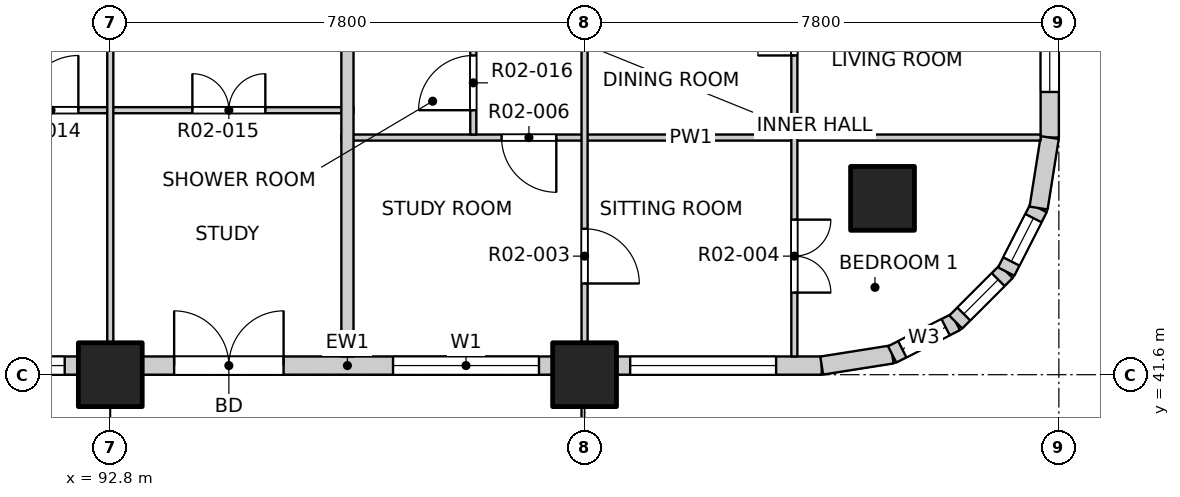
"""IFC4 building model, lengths in metres.
Left out: names, types, materials, properties, quantities, classifications, styles, units other than length and angle.
Written with IfcOpenShell. Run it as: python <this file> out.ifc"""

import sys

from ifc_helpers import new_model, si_unit, direction, frame, frame_2d, origin, origin_2d, place, context, subcontext, project, spatial, rectangle, extrude, element, fill, save


model = new_model("IFC4")
c1 = context("Model", 3, precision=1e-05, world=origin(), true_north=direction((0.0, 1.0)))
c2 = subcontext(c1, "Body", "Model", "MODEL_VIEW")
j1 = project(units=[si_unit("LENGTHUNIT", "METRE"), si_unit("PLANEANGLEUNIT", "RADIAN")], contexts=[c1])
p1 = place(None, origin())
s1 = spatial("IfcSite", under=j1, at=p1, CompositionType="ELEMENT")
p2 = place(p1, origin())
s2 = spatial("IfcBuilding", under=s1, at=p2, CompositionType="ELEMENT")
p3 = place(p2, frame((0.0, 0.0, 36.5)))
s3 = spatial("IfcBuildingStorey", under=s2, at=p3, CompositionType="ELEMENT", Elevation=36.5)
for number, where, z_axis, x_axis in (
    (1, (105.5, 44.5, -0.25), (0.0, 0.0, 1.0), (1.0, 0.0, 0.0)),
    (2, (92.8, 41.6, -0.25), (0.0, 0.0, 1.0), (1.0, 0.0, 0.0)),
    (3, (100.6, 41.6, -0.25), (0.0, 0.0, 1.0), (1.0, 0.0, 0.0)),
):
    element("IfcColumn", number, at=place(p3, frame(where, z_axis=z_axis, x_axis=x_axis)), inside=s3, PredefinedType="COLUMN", context=c2, shape_type="SweptSolid", body=[
        extrude(rectangle(XDim=1.05, YDim=1.05, at=origin_2d()), origin(), (0.0, 0.0, 1.0), 3.4),
    ])
p4 = place(p3, frame((85.525, 41.75, 0.0), z_axis=(0.0, 0.0, 1.0), x_axis=(1.0, 0.0, 0.0)))
e4 = element("IfcWall", 4, at=p4, inside=s3, PredefinedType="SOLIDWALL", context=c2, shape_type="SweptSolid", body=[
    extrude(rectangle(XDim=6.75, YDim=0.3, at=frame_2d((3.375, 0.0))), origin(), (0.0, 0.0, 1.0), 2.7),
])
p5 = place(p4, frame((0.525, 0.0, 0.0)))
e5 = element("IfcOpeningElement", 5, at=p5, cuts=e4, PredefinedType="OPENING", context=c2, shape_type="SweptSolid", body=[
    extrude(rectangle(XDim=1.8, YDim=2.4, at=frame_2d((0.9, 1.2))), frame((0.0, 0.16, 0.0), z_axis=(0.0, -1.0, 0.0), x_axis=(1.0, 0.0, 0.0)), (0.0, 0.0, 1.0), 0.32),
])
p6 = place(p4, frame((4.125, 0.0, 0.9)))
e6 = element("IfcOpeningElement", 6, at=p6, cuts=e4, PredefinedType="OPENING", context=c2, shape_type="SweptSolid", body=[
    extrude(rectangle(XDim=2.4, YDim=1.8, at=frame_2d((1.2, 0.9))), frame((0.0, 0.16, 0.0), z_axis=(0.0, -1.0, 0.0), x_axis=(1.0, 0.0, 0.0)), (0.0, 0.0, 1.0), 0.32),
])
p7 = place(p3, frame((93.325, 41.75, 0.0), z_axis=(0.0, 0.0, 1.0), x_axis=(1.0, 0.0, 0.0)))
e7 = element("IfcWall", 7, at=p7, inside=s3, PredefinedType="SOLIDWALL", context=c2, shape_type="SweptSolid", body=[
    extrude(rectangle(XDim=6.75, YDim=0.3, at=frame_2d((3.375, 0.0))), origin(), (0.0, 0.0, 1.0), 2.7),
])
p8 = place(p7, frame((0.525, 0.0, 0.0)))
e8 = element("IfcOpeningElement", 8, at=p8, cuts=e7, PredefinedType="OPENING", context=c2, shape_type="SweptSolid", body=[
    extrude(rectangle(XDim=1.8, YDim=2.4, at=frame_2d((0.9, 1.2))), frame((0.0, 0.16, 0.0), z_axis=(0.0, -1.0, 0.0), x_axis=(1.0, 0.0, 0.0)), (0.0, 0.0, 1.0), 0.32),
])
p9 = place(p7, frame((4.125, 0.0, 0.9)))
e9 = element("IfcOpeningElement", 9, at=p9, cuts=e7, PredefinedType="OPENING", context=c2, shape_type="SweptSolid", body=[
    extrude(rectangle(XDim=2.4, YDim=1.8, at=frame_2d((1.2, 0.9))), frame((0.0, 0.16, 0.0), z_axis=(0.0, -1.0, 0.0), x_axis=(1.0, 0.0, 0.0)), (0.0, 0.0, 1.0), 0.32),
])
p10 = place(p3, frame((101.125, 41.75, 0.0), z_axis=(0.0, 0.0, 1.0), x_axis=(1.0, 0.0, 0.0)))
e10 = element("IfcWall", 10, at=p10, inside=s3, PredefinedType="SOLIDWALL", context=c2, shape_type="SweptSolid", body=[
    extrude(rectangle(XDim=3.375, YDim=0.3, at=frame_2d((1.688, 0.0))), origin(), (0.0, 0.0, 1.0), 2.7),
])
p11 = place(p10, frame((0.225, 0.0, 0.9)))
e11 = element("IfcOpeningElement", 11, at=p11, cuts=e10, PredefinedType="OPENING", context=c2, shape_type="SweptSolid", body=[
    extrude(rectangle(XDim=2.4, YDim=1.8, at=frame_2d((1.2, 0.9))), frame((0.0, 0.16, 0.0), z_axis=(0.0, -1.0, 0.0), x_axis=(1.0, 0.0, 0.0)), (0.0, 0.0, 1.0), 0.32),
])
p12 = place(p3, frame((108.25, 45.5, 0.0), z_axis=(0.0, 0.0, 1.0), x_axis=(0.0, 1.0, 0.0)))
e12 = element("IfcWall", 12, at=p12, inside=s3, PredefinedType="SOLIDWALL", context=c2, shape_type="SweptSolid", body=[
    extrude(rectangle(XDim=3.375, YDim=0.3, at=frame_2d((1.688, 0.0))), origin(), (0.0, 0.0, 1.0), 2.7),
])
p13 = place(p12, frame((0.75, 0.0, 0.9)))
e13 = element("IfcOpeningElement", 13, at=p13, cuts=e12, PredefinedType="OPENING", context=c2, shape_type="SweptSolid", body=[
    extrude(rectangle(XDim=2.4, YDim=1.8, at=frame_2d((1.2, 0.9))), frame((0.0, 0.16, 0.0), z_axis=(0.0, -1.0, 0.0), x_axis=(1.0, 0.0, 0.0)), (0.0, 0.0, 1.0), 0.32),
])
p14 = place(p3, frame((104.5, 41.75, 0.0), z_axis=(0.0, 0.0, 1.0), x_axis=(0.987678452879, 0.156496880861, 0.0)))
e14 = element("IfcWall", 14, at=p14, inside=s3, PredefinedType="SOLIDWALL", context=c2, shape_type="SweptSolid", body=[
    extrude(rectangle(XDim=1.173, YDim=0.3, at=frame_2d((0.586, 0.0))), origin(), (0.0, 0.0, 1.0), 2.7),
])
p15 = place(p3, frame((105.659, 41.934, 0.0), z_axis=(0.0, 0.0, 1.0), x_axis=(0.890988677504, 0.454025524128, 0.0)))
e15 = element("IfcWall", 15, at=p15, inside=s3, PredefinedType="SOLIDWALL", context=c2, shape_type="SweptSolid", body=[
    extrude(rectangle(XDim=1.173, YDim=0.3, at=frame_2d((0.587, 0.0))), origin(), (0.0, 0.0, 1.0), 2.7),
])
p16 = place(p15, frame((0.187, 0.0, 0.9)))
e16 = element("IfcOpeningElement", 16, at=p16, cuts=e15, PredefinedType="OPENING", context=c2, shape_type="SweptSolid", body=[
    extrude(rectangle(XDim=0.8, YDim=1.2, at=frame_2d((0.4, 0.6))), frame((0.0, 0.16, 0.0), z_axis=(0.0, -1.0, 0.0), x_axis=(1.0, 0.0, 0.0)), (0.0, 0.0, 1.0), 0.32),
])
p17 = place(p3, frame((106.704, 42.466, 0.0), z_axis=(0.0, 0.0, 1.0), x_axis=(0.707106781187, 0.707106781187, 0.0)))
e17 = element("IfcWall", 17, at=p17, inside=s3, PredefinedType="SOLIDWALL", context=c2, shape_type="SweptSolid", body=[
    extrude(rectangle(XDim=1.173, YDim=0.3, at=frame_2d((0.586, 0.0))), origin(), (0.0, 0.0, 1.0), 2.7),
])
p18 = place(p17, frame((0.187, 0.0, 0.9)))
e18 = element("IfcOpeningElement", 18, at=p18, cuts=e17, PredefinedType="OPENING", context=c2, shape_type="SweptSolid", body=[
    extrude(rectangle(XDim=0.8, YDim=1.2, at=frame_2d((0.4, 0.6))), frame((0.0, 0.16, 0.0), z_axis=(0.0, -1.0, 0.0), x_axis=(1.0, 0.0, 0.0)), (0.0, 0.0, 1.0), 0.32),
])
p19 = place(p3, frame((107.534, 43.296, 0.0), z_axis=(0.0, 0.0, 1.0), x_axis=(0.454025524128, 0.890988677504, 0.0)))
e19 = element("IfcWall", 19, at=p19, inside=s3, PredefinedType="SOLIDWALL", context=c2, shape_type="SweptSolid", body=[
    extrude(rectangle(XDim=1.173, YDim=0.3, at=frame_2d((0.587, 0.0))), origin(), (0.0, 0.0, 1.0), 2.7),
])
p20 = place(p19, frame((0.187, 0.0, 0.9)))
e20 = element("IfcOpeningElement", 20, at=p20, cuts=e19, PredefinedType="OPENING", context=c2, shape_type="SweptSolid", body=[
    extrude(rectangle(XDim=0.8, YDim=1.2, at=frame_2d((0.4, 0.6))), frame((0.0, 0.16, 0.0), z_axis=(0.0, -1.0, 0.0), x_axis=(1.0, 0.0, 0.0)), (0.0, 0.0, 1.0), 0.32),
])
p21 = place(p3, frame((108.066, 44.341, 0.0), z_axis=(0.0, 0.0, 1.0), x_axis=(0.156496880861, 0.987678452879, 0.0)))
e21 = element("IfcWall", 21, at=p21, inside=s3, PredefinedType="SOLIDWALL", context=c2, shape_type="SweptSolid", body=[
    extrude(rectangle(XDim=1.173, YDim=0.3, at=frame_2d((0.586, 0.0))), origin(), (0.0, 0.0, 1.0), 2.7),
])
p22 = place(p3, frame((96.6, 45.5, 0.0), z_axis=(0.0, 0.0, 1.0), x_axis=(1.0, 0.0, 0.0)))
e22 = element("IfcWall", 22, at=p22, inside=s3, PredefinedType="PARTITIONING", context=c2, shape_type="SweptSolid", body=[
    extrude(rectangle(XDim=11.5, YDim=0.1, at=frame_2d((5.75, 0.0))), origin(), (0.0, 0.0, 1.0), 3.15),
])
p23 = place(p22, frame((2.635, 0.0, 0.0)))
e23 = element("IfcOpeningElement", 23, at=p23, cuts=e22, PredefinedType="OPENING", context=c2, shape_type="SweptSolid", body=[
    extrude(rectangle(XDim=0.9, YDim=2.1, at=frame_2d((0.45, 1.05))), frame((0.0, 0.06, 0.0), z_axis=(0.0, -1.0, 0.0), x_axis=(1.0, 0.0, 0.0)), (0.0, 0.0, 1.0), 0.12),
])
p24 = place(p3, frame((81.0, 45.95, 0.0), z_axis=(0.0, 0.0, 1.0), x_axis=(1.0, 0.0, 0.0)))
e24 = element("IfcWall", 24, at=p24, inside=s3, PredefinedType="PARTITIONING", context=c2, shape_type="SweptSolid", body=[
    extrude(rectangle(XDim=15.8, YDim=0.1, at=frame_2d((7.9, 0.0))), origin(), (0.0, 0.0, 1.0), 3.15),
])
p25 = place(p24, frame((0.625, 0.0, 0.0)))
e25 = element("IfcOpeningElement", 25, at=p25, cuts=e24, PredefinedType="OPENING", context=c2, shape_type="SweptSolid", body=[
    extrude(rectangle(XDim=0.9, YDim=2.1, at=frame_2d((0.45, 1.05))), frame((0.0, 0.06, 0.0), z_axis=(0.0, -1.0, 0.0), x_axis=(1.0, 0.0, 0.0)), (0.0, 0.0, 1.0), 0.12),
])
p26 = place(p24, frame((2.575, 0.0, 0.0)))
e26 = element("IfcOpeningElement", 26, at=p26, cuts=e24, PredefinedType="OPENING", context=c2, shape_type="SweptSolid", body=[
    extrude(rectangle(XDim=0.9, YDim=2.1, at=frame_2d((0.45, 1.05))), frame((0.0, 0.06, 0.0), z_axis=(0.0, -1.0, 0.0), x_axis=(1.0, 0.0, 0.0)), (0.0, 0.0, 1.0), 0.12),
])
p27 = place(p24, frame((5.35, 0.0, 0.0)))
e27 = element("IfcOpeningElement", 27, at=p27, cuts=e24, PredefinedType="OPENING", context=c2, shape_type="SweptSolid", body=[
    extrude(rectangle(XDim=1.2, YDim=2.1, at=frame_2d((0.6, 1.05))), frame((0.0, 0.06, 0.0), z_axis=(0.0, -1.0, 0.0), x_axis=(1.0, 0.0, 0.0)), (0.0, 0.0, 1.0), 0.12),
])
p28 = place(p24, frame((8.425, 0.0, 0.0)))
e28 = element("IfcOpeningElement", 28, at=p28, cuts=e24, PredefinedType="OPENING", context=c2, shape_type="SweptSolid", body=[
    extrude(rectangle(XDim=0.9, YDim=2.1, at=frame_2d((0.45, 1.05))), frame((0.0, 0.06, 0.0), z_axis=(0.0, -1.0, 0.0), x_axis=(1.0, 0.0, 0.0)), (0.0, 0.0, 1.0), 0.12),
])
p29 = place(p24, frame((10.375, 0.0, 0.0)))
e29 = element("IfcOpeningElement", 29, at=p29, cuts=e24, PredefinedType="OPENING", context=c2, shape_type="SweptSolid", body=[
    extrude(rectangle(XDim=0.9, YDim=2.1, at=frame_2d((0.45, 1.05))), frame((0.0, 0.06, 0.0), z_axis=(0.0, -1.0, 0.0), x_axis=(1.0, 0.0, 0.0)), (0.0, 0.0, 1.0), 0.12),
])
p30 = place(p24, frame((13.15, 0.0, 0.0)))
e30 = element("IfcOpeningElement", 30, at=p30, cuts=e24, PredefinedType="OPENING", context=c2, shape_type="SweptSolid", body=[
    extrude(rectangle(XDim=1.2, YDim=2.1, at=frame_2d((0.6, 1.05))), frame((0.0, 0.06, 0.0), z_axis=(0.0, -1.0, 0.0), x_axis=(1.0, 0.0, 0.0)), (0.0, 0.0, 1.0), 0.12),
])
p31 = place(p3, frame((92.8, 41.9, 0.0), z_axis=(0.0, 0.0, 1.0), x_axis=(0.0, 1.0, 0.0)))
e31 = element("IfcWall", 31, at=p31, inside=s3, PredefinedType="PARTITIONING", context=c2, shape_type="SweptSolid", body=[
    extrude(rectangle(XDim=7.45, YDim=0.1, at=frame_2d((3.725, 0.0))), origin(), (0.0, 0.0, 1.0), 2.55),
])
p32 = place(p3, frame((96.7, 41.9, 0.0), z_axis=(0.0, 0.0, 1.0), x_axis=(0.0, 1.0, 0.0)))
e32 = element("IfcWall", 32, at=p32, inside=s3, PredefinedType="PARTITIONING", context=c2, shape_type="SweptSolid", body=[
    extrude(rectangle(XDim=11.3, YDim=0.2, at=frame_2d((5.65, 0.0))), origin(), (0.0, 0.0, 1.0), 3.15),
])
p33 = place(p3, frame((98.77, 45.55, 0.0), z_axis=(0.0, 0.0, 1.0), x_axis=(0.0, 1.0, 0.0)))
e33 = element("IfcWall", 33, at=p33, inside=s3, PredefinedType="PARTITIONING", context=c2, shape_type="SweptSolid", body=[
    extrude(rectangle(XDim=8.95, YDim=0.1, at=frame_2d((4.475, 0.0))), origin(), (0.0, 0.0, 1.0), 3.15),
])
p34 = place(p33, frame((0.4, 0.0, 0.0)))
e34 = element("IfcOpeningElement", 34, at=p34, cuts=e33, PredefinedType="OPENING", context=c2, shape_type="SweptSolid", body=[
    extrude(rectangle(XDim=0.9, YDim=2.1, at=frame_2d((0.45, 1.05))), frame((0.0, 0.06, 0.0), z_axis=(0.0, -1.0, 0.0), x_axis=(1.0, 0.0, 0.0)), (0.0, 0.0, 1.0), 0.12),
])
p35 = place(p33, frame((2.5, 0.0, 0.0)))
e35 = element("IfcOpeningElement", 35, at=p35, cuts=e33, PredefinedType="OPENING", context=c2, shape_type="SweptSolid", body=[
    extrude(rectangle(XDim=0.9, YDim=2.1, at=frame_2d((0.45, 1.05))), frame((0.0, 0.06, 0.0), z_axis=(0.0, -1.0, 0.0), x_axis=(1.0, 0.0, 0.0)), (0.0, 0.0, 1.0), 0.12),
])
p36 = place(p33, frame((4.975, 0.0, 0.0)))
e36 = element("IfcOpeningElement", 36, at=p36, cuts=e33, PredefinedType="OPENING", context=c2, shape_type="SweptSolid", body=[
    extrude(rectangle(XDim=0.8, YDim=2.1, at=frame_2d((0.4, 1.05))), frame((0.0, 0.06, 0.0), z_axis=(0.0, -1.0, 0.0), x_axis=(1.0, 0.0, 0.0)), (0.0, 0.0, 1.0), 0.12),
])
p37 = place(p33, frame((7.4, 0.0, 0.0)))
e37 = element("IfcOpeningElement", 37, at=p37, cuts=e33, PredefinedType="OPENING", context=c2, shape_type="SweptSolid", body=[
    extrude(rectangle(XDim=0.8, YDim=2.1, at=frame_2d((0.4, 1.05))), frame((0.0, 0.06, 0.0), z_axis=(0.0, -1.0, 0.0), x_axis=(1.0, 0.0, 0.0)), (0.0, 0.0, 1.0), 0.12),
])
p38 = place(p3, frame((100.6, 41.9, 0.0), z_axis=(0.0, 0.0, 1.0), x_axis=(0.0, 1.0, 0.0)))
e38 = element("IfcWall", 38, at=p38, inside=s3, PredefinedType="PARTITIONING", context=c2, shape_type="SweptSolid", body=[
    extrude(rectangle(XDim=7.5, YDim=0.1, at=frame_2d((3.75, 0.0))), origin(), (0.0, 0.0, 1.0), 2.55),
])
p39 = place(p38, frame((1.2, 0.0, 0.0)))
e39 = element("IfcOpeningElement", 39, at=p39, cuts=e38, PredefinedType="OPENING", context=c2, shape_type="SweptSolid", body=[
    extrude(rectangle(XDim=0.9, YDim=2.1, at=frame_2d((0.45, 1.05))), frame((0.0, 0.06, 0.0), z_axis=(0.0, -1.0, 0.0), x_axis=(1.0, 0.0, 0.0)), (0.0, 0.0, 1.0), 0.12),
])
p40 = place(p38, frame((5.1, 0.0, 0.0)))
e40 = element("IfcOpeningElement", 40, at=p40, cuts=e38, PredefinedType="OPENING", context=c2, shape_type="SweptSolid", body=[
    extrude(rectangle(XDim=0.9, YDim=2.1, at=frame_2d((0.45, 1.05))), frame((0.0, 0.06, 0.0), z_axis=(0.0, -1.0, 0.0), x_axis=(1.0, 0.0, 0.0)), (0.0, 0.0, 1.0), 0.12),
])
p41 = place(p3, frame((104.05, 41.9, 0.0), z_axis=(0.0, 0.0, 1.0), x_axis=(0.0, 1.0, 0.0)))
e41 = element("IfcWall", 41, at=p41, inside=s3, PredefinedType="PARTITIONING", context=c2, shape_type="SweptSolid", body=[
    extrude(rectangle(XDim=19.1, YDim=0.1, at=frame_2d((9.55, 0.0))), origin(), (0.0, 0.0, 1.0), 3.15),
])
p42 = place(p41, frame((1.05, 0.0, 0.0)))
e42 = element("IfcOpeningElement", 42, at=p42, cuts=e41, PredefinedType="OPENING", context=c2, shape_type="SweptSolid", body=[
    extrude(rectangle(XDim=1.2, YDim=2.1, at=frame_2d((0.6, 1.05))), frame((0.0, 0.06, 0.0), z_axis=(0.0, -1.0, 0.0), x_axis=(1.0, 0.0, 0.0)), (0.0, 0.0, 1.0), 0.12),
])
p43 = place(p41, frame((4.95, 0.0, 0.0)))
e43 = element("IfcOpeningElement", 43, at=p43, cuts=e41, PredefinedType="OPENING", context=c2, shape_type="SweptSolid", body=[
    extrude(rectangle(XDim=1.2, YDim=2.1, at=frame_2d((0.6, 1.05))), frame((0.0, 0.06, 0.0), z_axis=(0.0, -1.0, 0.0), x_axis=(1.0, 0.0, 0.0)), (0.0, 0.0, 1.0), 0.12),
])
p44 = place(p41, frame((8.025, 0.0, 0.0)))
e44 = element("IfcOpeningElement", 44, at=p44, cuts=e41, PredefinedType="OPENING", context=c2, shape_type="SweptSolid", body=[
    extrude(rectangle(XDim=0.9, YDim=2.1, at=frame_2d((0.45, 1.05))), frame((0.0, 0.06, 0.0), z_axis=(0.0, -1.0, 0.0), x_axis=(1.0, 0.0, 0.0)), (0.0, 0.0, 1.0), 0.12),
])
p45 = place(p41, frame((9.975, 0.0, 0.0)))
e45 = element("IfcOpeningElement", 45, at=p45, cuts=e41, PredefinedType="OPENING", context=c2, shape_type="SweptSolid", body=[
    extrude(rectangle(XDim=0.9, YDim=2.1, at=frame_2d((0.45, 1.05))), frame((0.0, 0.06, 0.0), z_axis=(0.0, -1.0, 0.0), x_axis=(1.0, 0.0, 0.0)), (0.0, 0.0, 1.0), 0.12),
])
p46 = place(p41, frame((12.75, 0.0, 0.0)))
e46 = element("IfcOpeningElement", 46, at=p46, cuts=e41, PredefinedType="OPENING", context=c2, shape_type="SweptSolid", body=[
    extrude(rectangle(XDim=1.2, YDim=2.1, at=frame_2d((0.6, 1.05))), frame((0.0, 0.06, 0.0), z_axis=(0.0, -1.0, 0.0), x_axis=(1.0, 0.0, 0.0)), (0.0, 0.0, 1.0), 0.12),
])
p47 = place(p41, frame((15.825, 0.0, 0.0)))
e47 = element("IfcOpeningElement", 47, at=p47, cuts=e41, PredefinedType="OPENING", context=c2, shape_type="SweptSolid", body=[
    extrude(rectangle(XDim=0.9, YDim=2.1, at=frame_2d((0.45, 1.05))), frame((0.0, 0.06, 0.0), z_axis=(0.0, -1.0, 0.0), x_axis=(1.0, 0.0, 0.0)), (0.0, 0.0, 1.0), 0.12),
])
p48 = place(p41, frame((17.775, 0.0, 0.0)))
e48 = element("IfcOpeningElement", 48, at=p48, cuts=e41, PredefinedType="OPENING", context=c2, shape_type="SweptSolid", body=[
    extrude(rectangle(XDim=0.9, YDim=2.1, at=frame_2d((0.45, 1.05))), frame((0.0, 0.06, 0.0), z_axis=(0.0, -1.0, 0.0), x_axis=(1.0, 0.0, 0.0)), (0.0, 0.0, 1.0), 0.12),
])
p49 = place(p6, origin())
e49 = element("IfcWindow", 49, at=p49, inside=s3, PartitioningType="DOUBLE_PANEL_VERTICAL", PredefinedType="WINDOW", context=c2, shape_type="SweptSolid", body=[
    extrude(rectangle(XDim=2.4, YDim=1.8, at=frame_2d((1.2, 0.9))), frame((0.0, 0.03, 0.0), z_axis=(0.0, -1.0, 0.0), x_axis=(1.0, 0.0, 0.0)), (0.0, 0.0, 1.0), 0.06),
])
fill(e6, e49)
p50 = place(p8, origin())
e50 = element("IfcDoor", 50, at=p50, inside=s3, OperationType="DOUBLE_DOOR_SINGLE_SWING", PredefinedType="DOOR", context=c2, shape_type="SweptSolid", body=[
    extrude(rectangle(XDim=1.8, YDim=2.4, at=frame_2d((0.9, 1.2))), frame((0.0, 0.025, 0.0), z_axis=(0.0, -1.0, 0.0), x_axis=(1.0, 0.0, 0.0)), (0.0, 0.0, 1.0), 0.05),
])
fill(e8, e50)
p51 = place(p9, origin())
e51 = element("IfcWindow", 51, at=p51, inside=s3, PartitioningType="DOUBLE_PANEL_VERTICAL", PredefinedType="WINDOW", context=c2, shape_type="SweptSolid", body=[
    extrude(rectangle(XDim=2.4, YDim=1.8, at=frame_2d((1.2, 0.9))), frame((0.0, 0.03, 0.0), z_axis=(0.0, -1.0, 0.0), x_axis=(1.0, 0.0, 0.0)), (0.0, 0.0, 1.0), 0.06),
])
fill(e9, e51)
p52 = place(p11, origin())
e52 = element("IfcWindow", 52, at=p52, inside=s3, PartitioningType="DOUBLE_PANEL_VERTICAL", PredefinedType="WINDOW", context=c2, shape_type="SweptSolid", body=[
    extrude(rectangle(XDim=2.4, YDim=1.8, at=frame_2d((1.2, 0.9))), frame((0.0, 0.03, 0.0), z_axis=(0.0, -1.0, 0.0), x_axis=(1.0, 0.0, 0.0)), (0.0, 0.0, 1.0), 0.06),
])
fill(e11, e52)
p53 = place(p13, origin())
e53 = element("IfcWindow", 53, at=p53, inside=s3, PartitioningType="DOUBLE_PANEL_VERTICAL", PredefinedType="WINDOW", context=c2, shape_type="SweptSolid", body=[
    extrude(rectangle(XDim=2.4, YDim=1.8, at=frame_2d((1.2, 0.9))), frame((0.0, 0.03, 0.0), z_axis=(0.0, -1.0, 0.0), x_axis=(1.0, 0.0, 0.0)), (0.0, 0.0, 1.0), 0.06),
])
fill(e13, e53)
p54 = place(p16, origin())
e54 = element("IfcWindow", 54, at=p54, inside=s3, PartitioningType="SINGLE_PANEL", PredefinedType="WINDOW", context=c2, shape_type="SweptSolid", body=[
    extrude(rectangle(XDim=0.8, YDim=1.2, at=frame_2d((0.4, 0.6))), frame((0.0, 0.03, 0.0), z_axis=(0.0, -1.0, 0.0), x_axis=(1.0, 0.0, 0.0)), (0.0, 0.0, 1.0), 0.06),
])
fill(e16, e54)
p55 = place(p18, origin())
e55 = element("IfcWindow", 55, at=p55, inside=s3, PartitioningType="SINGLE_PANEL", PredefinedType="WINDOW", context=c2, shape_type="SweptSolid", body=[
    extrude(rectangle(XDim=0.8, YDim=1.2, at=frame_2d((0.4, 0.6))), frame((0.0, 0.03, 0.0), z_axis=(0.0, -1.0, 0.0), x_axis=(1.0, 0.0, 0.0)), (0.0, 0.0, 1.0), 0.06),
])
fill(e18, e55)
p56 = place(p20, origin())
e56 = element("IfcWindow", 56, at=p56, inside=s3, PartitioningType="SINGLE_PANEL", PredefinedType="WINDOW", context=c2, shape_type="SweptSolid", body=[
    extrude(rectangle(XDim=0.8, YDim=1.2, at=frame_2d((0.4, 0.6))), frame((0.0, 0.03, 0.0), z_axis=(0.0, -1.0, 0.0), x_axis=(1.0, 0.0, 0.0)), (0.0, 0.0, 1.0), 0.06),
])
fill(e20, e56)
p57 = place(p39, origin())
e57 = element("IfcDoor", 57, at=p57, inside=s3, OperationType="SINGLE_SWING_RIGHT", PredefinedType="DOOR", context=c2, shape_type="SweptSolid", body=[
    extrude(rectangle(XDim=0.9, YDim=2.1, at=frame_2d((0.45, 1.05))), frame((0.0, 0.025, 0.0), z_axis=(0.0, -1.0, 0.0), x_axis=(1.0, 0.0, 0.0)), (0.0, 0.0, 1.0), 0.05),
])
fill(e39, e57)
p58 = place(p42, origin())
e58 = element("IfcDoor", 58, at=p58, inside=s3, OperationType="DOUBLE_DOOR_SINGLE_SWING", PredefinedType="DOOR", context=c2, shape_type="SweptSolid", body=[
    extrude(rectangle(XDim=1.2, YDim=2.1, at=frame_2d((0.6, 1.05))), frame((0.0, 0.025, 0.0), z_axis=(0.0, -1.0, 0.0), x_axis=(1.0, 0.0, 0.0)), (0.0, 0.0, 1.0), 0.05),
])
fill(e42, e58)
p59 = place(p23, origin())
e59 = element("IfcDoor", 59, at=p59, inside=s3, OperationType="SINGLE_SWING_LEFT", PredefinedType="DOOR", context=c2, shape_type="SweptSolid", body=[
    extrude(rectangle(XDim=0.9, YDim=2.1, at=frame_2d((0.45, 1.05))), frame((0.0, 0.025, 0.0), z_axis=(0.0, -1.0, 0.0), x_axis=(1.0, 0.0, 0.0)), (0.0, 0.0, 1.0), 0.05),
])
fill(e23, e59)
p60 = place(p29, origin())
e60 = element("IfcDoor", 60, at=p60, inside=s3, OperationType="SINGLE_SWING_RIGHT", PredefinedType="DOOR", context=c2, shape_type="SweptSolid", body=[
    extrude(rectangle(XDim=0.9, YDim=2.1, at=frame_2d((0.45, 1.05))), frame((0.0, 0.025, 0.0), z_axis=(0.0, -1.0, 0.0), x_axis=(1.0, 0.0, 0.0)), (0.0, 0.0, 1.0), 0.05),
])
fill(e29, e60)
p61 = place(p30, origin())
e61 = element("IfcDoor", 61, at=p61, inside=s3, OperationType="DOUBLE_DOOR_SINGLE_SWING", PredefinedType="DOOR", context=c2, shape_type="SweptSolid", body=[
    extrude(rectangle(XDim=1.2, YDim=2.1, at=frame_2d((0.6, 1.05))), frame((0.0, 0.025, 0.0), z_axis=(0.0, -1.0, 0.0), x_axis=(1.0, 0.0, 0.0)), (0.0, 0.0, 1.0), 0.05),
])
fill(e30, e61)
p62 = place(p34, origin())
e62 = element("IfcDoor", 62, at=p62, inside=s3, OperationType="SINGLE_SWING_LEFT", PredefinedType="DOOR", context=c2, shape_type="SweptSolid", body=[
    extrude(rectangle(XDim=0.9, YDim=2.1, at=frame_2d((0.45, 1.05))), frame((0.0, 0.025, 0.0), z_axis=(0.0, -1.0, 0.0), x_axis=(1.0, 0.0, 0.0)), (0.0, 0.0, 1.0), 0.05),
])
fill(e34, e62)
p63 = place(p43, origin())
e63 = element("IfcDoor", 63, at=p63, inside=s3, OperationType="DOUBLE_DOOR_SINGLE_SWING", PredefinedType="DOOR", context=c2, shape_type="SweptSolid", body=[
    extrude(rectangle(XDim=1.2, YDim=2.1, at=frame_2d((0.6, 1.05))), frame((0.0, 0.025, 0.0), z_axis=(0.0, -1.0, 0.0), x_axis=(1.0, 0.0, 0.0)), (0.0, 0.0, 1.0), 0.05),
])
fill(e43, e63)
save(model, sys.argv[1])
